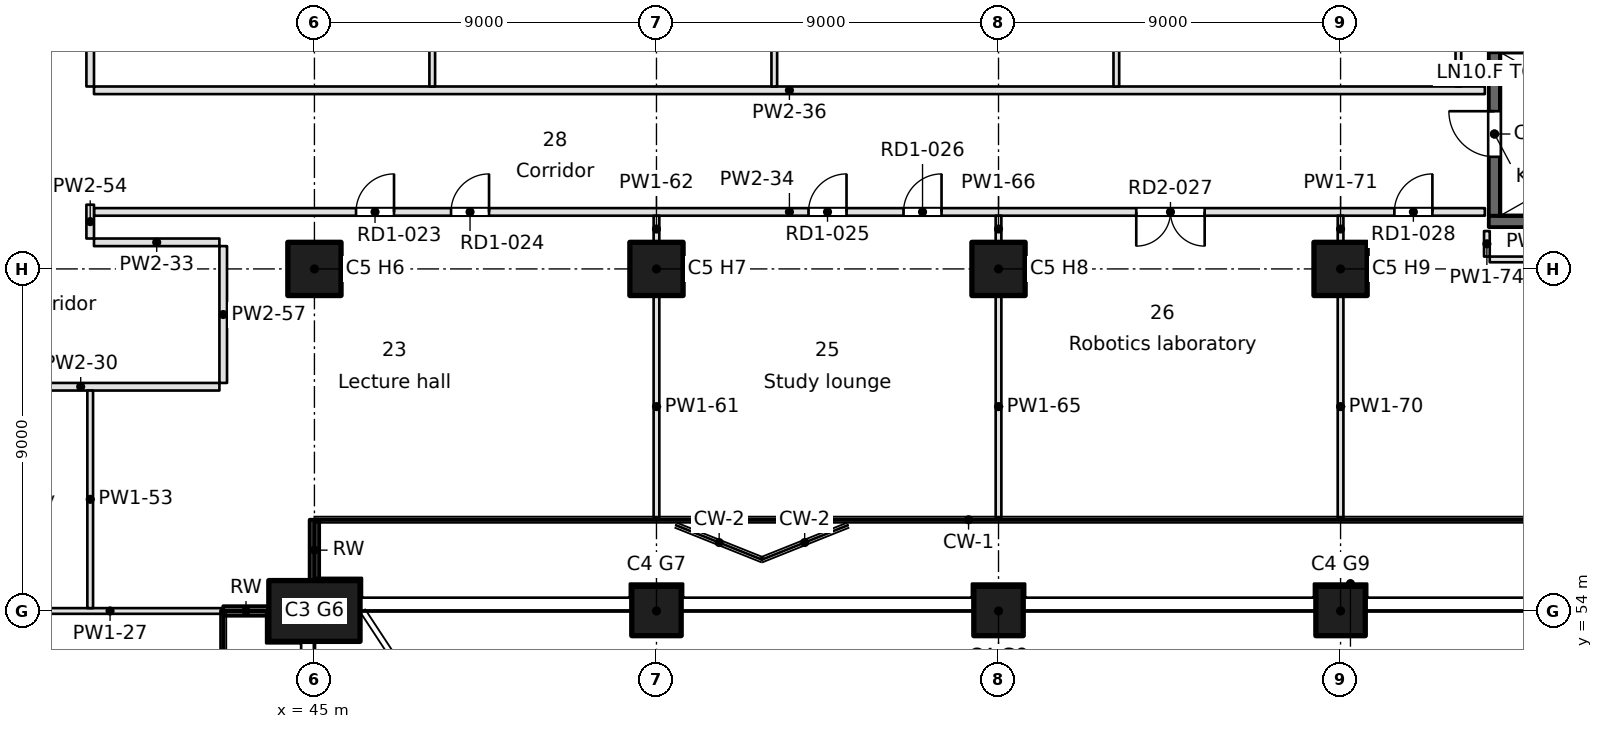
"""IFC4 building model, lengths in metres.
Left out: names, types, materials, properties, quantities, classifications, styles, units other than length and angle.
Written with IfcOpenShell. Run it as: python <this file> out.ifc"""

import sys

from ifc_helpers import new_model, si_unit, direction, frame, frame_2d, origin, origin_2d, place, context, subcontext, project, spatial, rectangle, extrude, element, fill, save


model = new_model("IFC4")
c1 = context("Model", 3, precision=1e-05, world=origin(), true_north=direction((0.0, 1.0)))
c2 = subcontext(c1, "Body", "Model", "MODEL_VIEW")
j1 = project(units=[si_unit("LENGTHUNIT", "METRE"), si_unit("PLANEANGLEUNIT", "RADIAN")], contexts=[c1])
p1 = place(None, origin())
s1 = spatial("IfcSite", under=j1, at=p1, CompositionType="ELEMENT")
p2 = place(p1, origin())
s2 = spatial("IfcBuilding", under=s1, at=p2, CompositionType="ELEMENT")
p3 = place(p2, frame((0.0, 0.0, 35.8)))
s3 = spatial("IfcBuildingStorey", under=s2, at=p3, CompositionType="ELEMENT", Elevation=35.8)
p4 = place(p3, frame((45.0, 54.0, 0.0), z_axis=(0.0, 0.0, 1.0), x_axis=(1.0, 0.0, 0.0)))
e1 = element("IfcColumn", 1, at=p4, inside=s3, PredefinedType="COLUMN", context=c2, shape_type="SweptSolid", body=[
    extrude(rectangle(XDim=2.4, YDim=1.6, at=origin_2d()), origin(), (0.0, 0.0, 1.0), 3.7),
])
for number, where, z_axis, x_axis in (
    (2, (54.0, 54.0, 0.0), (0.0, 0.0, 1.0), (1.0, 0.0, 0.0)),
    (3, (63.0, 54.0, 0.0), (0.0, 0.0, 1.0), (1.0, 0.0, 0.0)),
    (4, (72.0, 54.0, 0.0), (0.0, 0.0, 1.0), (1.0, 0.0, 0.0)),
):
    element("IfcColumn", number, at=place(p3, frame(where, z_axis=z_axis, x_axis=x_axis)), inside=s3, PredefinedType="COLUMN", context=c2, shape_type="SweptSolid", body=[
        extrude(rectangle(XDim=1.3, YDim=1.3, at=origin_2d()), origin(), (0.0, 0.0, 1.0), 3.7),
    ])
for number, where, z_axis, x_axis in (
    (5, (45.0, 63.0, 0.0), (0.0, 0.0, 1.0), (1.0, 0.0, 0.0)),
    (6, (54.0, 63.0, 0.0), (0.0, 0.0, 1.0), (1.0, 0.0, 0.0)),
    (7, (63.0, 63.0, 0.0), (0.0, 0.0, 1.0), (1.0, 0.0, 0.0)),
    (8, (72.0, 63.0, 0.0), (0.0, 0.0, 1.0), (1.0, 0.0, 0.0)),
):
    element("IfcColumn", number, at=place(p3, frame(where, z_axis=z_axis, x_axis=x_axis)), inside=s3, PredefinedType="COLUMN", context=c2, shape_type="SweptSolid", body=[
        extrude(rectangle(XDim=1.4, YDim=1.4, at=origin_2d()), origin(), (0.0, 0.0, 1.0), 3.7),
    ])
p5 = place(p3, frame((42.599, 54.0, 0.0), z_axis=(0.0, 0.0, 1.0), x_axis=(0.999999917344, 0.000406586671, 0.0)))
e9 = element("IfcWall", 9, at=p5, inside=s3, PredefinedType="SOLIDWALL", context=c2, shape_type="SweptSolid", body=[
    extrude(rectangle(XDim=1.201, YDim=0.25, at=frame_2d((0.601, 0.0))), origin(), (0.0, 0.0, 1.0), 3.3),
])
p6 = place(p3, frame((44.999, 54.8, 0.0), z_axis=(0.0, 0.0, 1.0), x_axis=(0.000152508767, 0.999999988371, 0.0)))
e10 = element("IfcWall", 10, at=p6, inside=s3, PredefinedType="SOLIDWALL", context=c2, shape_type="SweptSolid", body=[
    extrude(rectangle(XDim=1.601, YDim=0.25, at=frame_2d((0.8, 0.0))), origin(), (0.0, 0.0, 1.0), 3.3),
])
p7 = place(p3, frame((75.9, 64.25, -0.4), z_axis=(0.0, 0.0, 1.0), x_axis=(1.0, 0.0, 0.0)))
e11 = element("IfcWall", 11, at=p7, inside=s3, PredefinedType="SOLIDWALL", context=c2, shape_type="SweptSolid", body=[
    extrude(rectangle(XDim=8.2, YDim=0.3, at=frame_2d((4.1, 0.0))), origin(), (0.0, 0.0, 1.0), 3.7),
])
p8 = place(p3, frame((76.05, 64.4, -0.4), z_axis=(0.0, 0.0, 1.0), x_axis=(0.0, 1.0, 0.0)))
e12 = element("IfcWall", 12, at=p8, inside=s3, PredefinedType="SOLIDWALL", context=c2, shape_type="SweptSolid", body=[
    extrude(rectangle(XDim=4.3, YDim=0.3, at=frame_2d((2.15, 0.0))), origin(), (0.0, 0.0, 1.0), 3.7),
])
p9 = place(p8, frame((1.55, 0.0, 0.4)))
e13 = element("IfcOpeningElement", 13, at=p9, cuts=e12, PredefinedType="OPENING", context=c2, shape_type="SweptSolid", body=[
    extrude(rectangle(XDim=1.2, YDim=2.1, at=frame_2d((0.6, 1.05))), frame((0.0, 0.15, 0.0), z_axis=(0.0, -1.0, 0.0), x_axis=(1.0, 0.0, 0.0)), (0.0, 0.0, 1.0), 0.3),
])
p10 = place(p3, frame((36.7, 54.0, 0.0), z_axis=(0.0, 0.0, 1.0), x_axis=(1.0, 0.0, 0.0)))
e14 = element("IfcWall", 14, at=p10, inside=s3, PredefinedType="PARTITIONING", context=c2, shape_type="SweptSolid", body=[
    extrude(rectangle(XDim=5.845, YDim=0.15, at=frame_2d((2.922, 0.0))), origin(), (0.0, 0.0, 1.0), 3.3),
])
p11 = place(p3, frame((42.5, 59.9, 0.0), z_axis=(0.0, 0.0, 1.0), x_axis=(-1.0, 0.0, 0.0)))
e15 = element("IfcWall", 15, at=p11, inside=s3, PredefinedType="PARTITIONING", context=c2, shape_type="SweptSolid", body=[
    extrude(rectangle(XDim=7.3, YDim=0.2, at=frame_2d((3.65, 0.0))), origin(), (0.0, 0.0, 1.0), 3.3),
])
p12 = place(p3, frame((75.925, 63.25, 0.0), z_axis=(0.0, 0.0, 1.0), x_axis=(1.0, 0.0, 0.0)))
e16 = element("IfcWall", 16, at=p12, inside=s3, PredefinedType="PARTITIONING", context=c2, shape_type="SweptSolid", body=[
    extrude(rectangle(XDim=4.375, YDim=0.15, at=frame_2d((2.188, 0.0))), origin(), (0.0, 0.0, 1.0), 3.3),
])
p13 = place(p3, frame((39.2, 63.7, 0.0), z_axis=(0.0, 0.0, 1.0), x_axis=(1.0, 0.0, 0.0)))
e17 = element("IfcWall", 17, at=p13, inside=s3, PredefinedType="PARTITIONING", context=c2, shape_type="SweptSolid", body=[
    extrude(rectangle(XDim=3.3, YDim=0.2, at=frame_2d((1.65, 0.0))), origin(), (0.0, 0.0, 1.0), 3.3),
])
p14 = place(p3, frame((75.796, 64.5, 0.0), z_axis=(0.0, 0.0, 1.0), x_axis=(-1.0, 0.0, 0.0)))
e18 = element("IfcWall", 18, at=p14, inside=s3, PredefinedType="PARTITIONING", context=c2, shape_type="SweptSolid", body=[
    extrude(rectangle(XDim=36.596, YDim=0.2, at=frame_2d((18.298, 0.0))), origin(), (0.0, 0.0, 1.0), 3.3),
])
p15 = place(p14, frame((28.702, 0.0, 0.0)))
e19 = element("IfcOpeningElement", 19, at=p15, cuts=e18, PredefinedType="OPENING", context=c2, shape_type="SweptSolid", body=[
    extrude(rectangle(XDim=1.0, YDim=2.1, at=frame_2d((0.5, 1.05))), frame((0.0, 0.1, 0.0), z_axis=(0.0, -1.0, 0.0), x_axis=(1.0, 0.0, 0.0)), (0.0, 0.0, 1.0), 0.2),
])
p16 = place(p14, frame((26.202, 0.0, 0.0)))
e20 = element("IfcOpeningElement", 20, at=p16, cuts=e18, PredefinedType="OPENING", context=c2, shape_type="SweptSolid", body=[
    extrude(rectangle(XDim=1.0, YDim=2.1, at=frame_2d((0.5, 1.05))), frame((0.0, 0.1, 0.0), z_axis=(0.0, -1.0, 0.0), x_axis=(1.0, 0.0, 0.0)), (0.0, 0.0, 1.0), 0.2),
])
p17 = place(p14, frame((16.795, 0.0, 0.0)))
e21 = element("IfcOpeningElement", 21, at=p17, cuts=e18, PredefinedType="OPENING", context=c2, shape_type="SweptSolid", body=[
    extrude(rectangle(XDim=1.0, YDim=2.1, at=frame_2d((0.5, 1.05))), frame((0.0, 0.1, 0.0), z_axis=(0.0, -1.0, 0.0), x_axis=(1.0, 0.0, 0.0)), (0.0, 0.0, 1.0), 0.2),
])
p18 = place(p14, frame((14.295, 0.0, 0.0)))
e22 = element("IfcOpeningElement", 22, at=p18, cuts=e18, PredefinedType="OPENING", context=c2, shape_type="SweptSolid", body=[
    extrude(rectangle(XDim=1.0, YDim=2.1, at=frame_2d((0.5, 1.05))), frame((0.0, 0.1, 0.0), z_axis=(0.0, -1.0, 0.0), x_axis=(1.0, 0.0, 0.0)), (0.0, 0.0, 1.0), 0.2),
])
p19 = place(p14, frame((7.372, 0.0, 0.0)))
e23 = element("IfcOpeningElement", 23, at=p19, cuts=e18, PredefinedType="OPENING", context=c2, shape_type="SweptSolid", body=[
    extrude(rectangle(XDim=1.8, YDim=2.1, at=frame_2d((0.9, 1.05))), frame((0.0, 0.1, 0.0), z_axis=(0.0, -1.0, 0.0), x_axis=(1.0, 0.0, 0.0)), (0.0, 0.0, 1.0), 0.2),
])
p20 = place(p14, frame((1.38, 0.0, 0.0)))
e24 = element("IfcOpeningElement", 24, at=p20, cuts=e18, PredefinedType="OPENING", context=c2, shape_type="SweptSolid", body=[
    extrude(rectangle(XDim=1.0, YDim=2.1, at=frame_2d((0.5, 1.05))), frame((0.0, 0.1, 0.0), z_axis=(0.0, -1.0, 0.0), x_axis=(1.0, 0.0, 0.0)), (0.0, 0.0, 1.0), 0.2),
])
p21 = place(p3, frame((39.2, 67.7, 0.0), z_axis=(0.0, 0.0, 1.0), x_axis=(1.0, 0.0, 0.0)))
e25 = element("IfcWall", 25, at=p21, inside=s3, PredefinedType="PARTITIONING", context=c2, shape_type="SweptSolid", body=[
    extrude(rectangle(XDim=36.596, YDim=0.2, at=frame_2d((18.298, 0.0))), origin(), (0.0, 0.0, 1.0), 3.3),
])
p22 = place(p3, frame((39.1, 59.8, 0.0), z_axis=(0.0, 0.0, 1.0), x_axis=(0.0, -1.0, 0.0)))
e26 = element("IfcWall", 26, at=p22, inside=s3, PredefinedType="PARTITIONING", context=c2, shape_type="SweptSolid", body=[
    extrude(rectangle(XDim=5.725, YDim=0.15, at=frame_2d((2.863, 0.0))), origin(), (0.0, 0.0, 1.0), 3.3),
])
p23 = place(p3, frame((39.1, 64.69, 0.0), z_axis=(0.0, 0.0, 1.0), x_axis=(0.0, -1.0, 0.0)))
e27 = element("IfcWall", 27, at=p23, inside=s3, PredefinedType="PARTITIONING", context=c2, shape_type="SweptSolid", body=[
    extrude(rectangle(XDim=0.89, YDim=0.2, at=frame_2d((0.445, 0.0))), origin(), (0.0, 0.0, 1.0), 3.3),
])
p24 = place(p3, frame((39.1, 82.012, 0.0), z_axis=(0.0, 0.0, 1.0), x_axis=(0.0, -1.0, 0.0)))
e28 = element("IfcWall", 28, at=p24, inside=s3, PredefinedType="PARTITIONING", context=c2, shape_type="SweptSolid", body=[
    extrude(rectangle(XDim=14.212, YDim=0.2, at=frame_2d((7.106, 0.0))), origin(), (0.0, 0.0, 1.0), 3.3),
])
p25 = place(p24, frame((6.733, 0.0, 0.0)))
e29 = element("IfcOpeningElement", 29, at=p25, cuts=e28, PredefinedType="OPENING", context=c2, shape_type="SweptSolid", body=[
    extrude(rectangle(XDim=1.0, YDim=2.1, at=frame_2d((0.5, 1.05))), frame((0.0, 0.1, 0.0), z_axis=(0.0, -1.0, 0.0), x_axis=(1.0, 0.0, 0.0)), (0.0, 0.0, 1.0), 0.2),
])
p26 = place(p24, frame((4.233, 0.0, 0.0)))
e30 = element("IfcOpeningElement", 30, at=p26, cuts=e28, PredefinedType="OPENING", context=c2, shape_type="SweptSolid", body=[
    extrude(rectangle(XDim=1.0, YDim=2.1, at=frame_2d((0.5, 1.05))), frame((0.0, 0.1, 0.0), z_axis=(0.0, -1.0, 0.0), x_axis=(1.0, 0.0, 0.0)), (0.0, 0.0, 1.0), 0.2),
])
p27 = place(p3, frame((42.6, 63.6, 0.0), z_axis=(0.0, 0.0, 1.0), x_axis=(0.0, -1.0, 0.0)))
e31 = element("IfcWall", 31, at=p27, inside=s3, PredefinedType="PARTITIONING", context=c2, shape_type="SweptSolid", body=[
    extrude(rectangle(XDim=3.6, YDim=0.2, at=frame_2d((1.8, 0.0))), origin(), (0.0, 0.0, 1.0), 3.3),
])
p28 = place(p3, frame((48.1, 81.7, 0.0), z_axis=(0.0, 0.0, 1.0), x_axis=(0.0, -1.0, 0.0)))
e32 = element("IfcWall", 32, at=p28, inside=s3, PredefinedType="PARTITIONING", context=c2, shape_type="SweptSolid", body=[
    extrude(rectangle(XDim=13.9, YDim=0.15, at=frame_2d((6.95, 0.0))), origin(), (0.0, 0.0, 1.0), 3.3),
])
p29 = place(p3, frame((54.0, 62.3, 0.0), z_axis=(0.0, 0.0, 1.0), x_axis=(0.0, -1.0, 0.0)))
e33 = element("IfcWall", 33, at=p29, inside=s3, PredefinedType="PARTITIONING", context=c2, shape_type="SweptSolid", body=[
    extrude(rectangle(XDim=5.845, YDim=0.15, at=frame_2d((2.923, 0.0))), origin(), (0.0, 0.0, 1.0), 3.3),
])
p30 = place(p3, frame((54.0, 64.4, 0.0), z_axis=(0.0, 0.0, 1.0), x_axis=(0.0, -1.0, 0.0)))
e34 = element("IfcWall", 34, at=p30, inside=s3, PredefinedType="PARTITIONING", context=c2, shape_type="SweptSolid", body=[
    extrude(rectangle(XDim=0.7, YDim=0.15, at=frame_2d((0.35, 0.0))), origin(), (0.0, 0.0, 1.0), 3.3),
])
p31 = place(p3, frame((57.1, 81.7, 0.0), z_axis=(0.0, 0.0, 1.0), x_axis=(0.0, -1.0, 0.0)))
e35 = element("IfcWall", 35, at=p31, inside=s3, PredefinedType="PARTITIONING", context=c2, shape_type="SweptSolid", body=[
    extrude(rectangle(XDim=13.9, YDim=0.15, at=frame_2d((6.95, 0.0))), origin(), (0.0, 0.0, 1.0), 3.3),
])
p32 = place(p3, frame((63.0, 62.3, 0.0), z_axis=(0.0, 0.0, 1.0), x_axis=(0.0, -1.0, 0.0)))
e36 = element("IfcWall", 36, at=p32, inside=s3, PredefinedType="PARTITIONING", context=c2, shape_type="SweptSolid", body=[
    extrude(rectangle(XDim=5.845, YDim=0.15, at=frame_2d((2.923, 0.0))), origin(), (0.0, 0.0, 1.0), 3.3),
])
p33 = place(p3, frame((63.0, 64.4, 0.0), z_axis=(0.0, 0.0, 1.0), x_axis=(0.0, -1.0, 0.0)))
e37 = element("IfcWall", 37, at=p33, inside=s3, PredefinedType="PARTITIONING", context=c2, shape_type="SweptSolid", body=[
    extrude(rectangle(XDim=0.7, YDim=0.15, at=frame_2d((0.35, 0.0))), origin(), (0.0, 0.0, 1.0), 3.3),
])
p34 = place(p3, frame((66.1, 81.7, 0.0), z_axis=(0.0, 0.0, 1.0), x_axis=(0.0, -1.0, 0.0)))
e38 = element("IfcWall", 38, at=p34, inside=s3, PredefinedType="PARTITIONING", context=c2, shape_type="SweptSolid", body=[
    extrude(rectangle(XDim=13.9, YDim=0.15, at=frame_2d((6.95, 0.0))), origin(), (0.0, 0.0, 1.0), 3.3),
])
p35 = place(p3, frame((72.0, 62.3, 0.0), z_axis=(0.0, 0.0, 1.0), x_axis=(0.0, -1.0, 0.0)))
e39 = element("IfcWall", 39, at=p35, inside=s3, PredefinedType="PARTITIONING", context=c2, shape_type="SweptSolid", body=[
    extrude(rectangle(XDim=5.845, YDim=0.15, at=frame_2d((2.923, 0.0))), origin(), (0.0, 0.0, 1.0), 3.3),
])
p36 = place(p3, frame((72.0, 64.4, 0.0), z_axis=(0.0, 0.0, 1.0), x_axis=(0.0, -1.0, 0.0)))
e40 = element("IfcWall", 40, at=p36, inside=s3, PredefinedType="PARTITIONING", context=c2, shape_type="SweptSolid", body=[
    extrude(rectangle(XDim=0.7, YDim=0.15, at=frame_2d((0.35, 0.0))), origin(), (0.0, 0.0, 1.0), 3.3),
])
p37 = place(p3, frame((75.1, 81.7, 0.0), z_axis=(0.0, 0.0, 1.0), x_axis=(0.0, -1.0, 0.0)))
e41 = element("IfcWall", 41, at=p37, inside=s3, PredefinedType="PARTITIONING", context=c2, shape_type="SweptSolid", body=[
    extrude(rectangle(XDim=13.9, YDim=0.15, at=frame_2d((6.95, 0.0))), origin(), (0.0, 0.0, 1.0), 3.3),
])
p38 = place(p3, frame((75.85, 63.996, 0.0), z_axis=(0.0, 0.0, 1.0), x_axis=(0.0, -1.0, 0.0)))
e42 = element("IfcWall", 42, at=p38, inside=s3, PredefinedType="PARTITIONING", context=c2, shape_type="SweptSolid", body=[
    extrude(rectangle(XDim=0.671, YDim=0.15, at=frame_2d((0.335, 0.0))), origin(), (0.0, 0.0, 1.0), 3.3),
])
p39 = place(p9, origin())
e43 = element("IfcDoor", 43, at=p39, inside=s3, OperationType="SINGLE_SWING_RIGHT", PredefinedType="DOOR", context=c2, shape_type="SweptSolid", body=[
    extrude(rectangle(XDim=1.2, YDim=2.1, at=frame_2d((0.6, 1.05))), frame((0.0, 0.025, 0.0), z_axis=(0.0, -1.0, 0.0), x_axis=(1.0, 0.0, 0.0)), (0.0, 0.0, 1.0), 0.05),
])
fill(e13, e43)
p40 = place(p15, frame((1.0, 0.0, 0.0), z_axis=(0.0, 0.0, 1.0), x_axis=(-1.0, 0.0, 0.0)))
e44 = element("IfcDoor", 44, at=p40, inside=s3, OperationType="SINGLE_SWING_RIGHT", PredefinedType="DOOR", context=c2, shape_type="SweptSolid", body=[
    extrude(rectangle(XDim=1.0, YDim=2.1, at=frame_2d((0.5, 1.05))), frame((0.0, 0.025, 0.0), z_axis=(0.0, -1.0, 0.0), x_axis=(1.0, 0.0, 0.0)), (0.0, 0.0, 1.0), 0.05),
])
fill(e19, e44)
p41 = place(p16, frame((1.0, 0.0, 0.0), z_axis=(0.0, 0.0, 1.0), x_axis=(-1.0, 0.0, 0.0)))
e45 = element("IfcDoor", 45, at=p41, inside=s3, OperationType="SINGLE_SWING_RIGHT", PredefinedType="DOOR", context=c2, shape_type="SweptSolid", body=[
    extrude(rectangle(XDim=1.0, YDim=2.1, at=frame_2d((0.5, 1.05))), frame((0.0, 0.025, 0.0), z_axis=(0.0, -1.0, 0.0), x_axis=(1.0, 0.0, 0.0)), (0.0, 0.0, 1.0), 0.05),
])
fill(e20, e45)
p42 = place(p17, frame((1.0, 0.0, 0.0), z_axis=(0.0, 0.0, 1.0), x_axis=(-1.0, 0.0, 0.0)))
e46 = element("IfcDoor", 46, at=p42, inside=s3, OperationType="SINGLE_SWING_RIGHT", PredefinedType="DOOR", context=c2, shape_type="SweptSolid", body=[
    extrude(rectangle(XDim=1.0, YDim=2.1, at=frame_2d((0.5, 1.05))), frame((0.0, 0.025, 0.0), z_axis=(0.0, -1.0, 0.0), x_axis=(1.0, 0.0, 0.0)), (0.0, 0.0, 1.0), 0.05),
])
fill(e21, e46)
p43 = place(p18, frame((1.0, 0.0, 0.0), z_axis=(0.0, 0.0, 1.0), x_axis=(-1.0, 0.0, 0.0)))
e47 = element("IfcDoor", 47, at=p43, inside=s3, OperationType="SINGLE_SWING_RIGHT", PredefinedType="DOOR", context=c2, shape_type="SweptSolid", body=[
    extrude(rectangle(XDim=1.0, YDim=2.1, at=frame_2d((0.5, 1.05))), frame((0.0, 0.025, 0.0), z_axis=(0.0, -1.0, 0.0), x_axis=(1.0, 0.0, 0.0)), (0.0, 0.0, 1.0), 0.05),
])
fill(e22, e47)
p44 = place(p19, origin())
e48 = element("IfcDoor", 48, at=p44, inside=s3, OperationType="DOUBLE_DOOR_SINGLE_SWING", PredefinedType="DOOR", context=c2, shape_type="SweptSolid", body=[
    extrude(rectangle(XDim=1.8, YDim=2.1, at=frame_2d((0.9, 1.05))), frame((0.0, 0.025, 0.0), z_axis=(0.0, -1.0, 0.0), x_axis=(1.0, 0.0, 0.0)), (0.0, 0.0, 1.0), 0.05),
])
fill(e23, e48)
p45 = place(p20, frame((1.0, 0.0, 0.0), z_axis=(0.0, 0.0, 1.0), x_axis=(-1.0, 0.0, 0.0)))
e49 = element("IfcDoor", 49, at=p45, inside=s3, OperationType="SINGLE_SWING_RIGHT", PredefinedType="DOOR", context=c2, shape_type="SweptSolid", body=[
    extrude(rectangle(XDim=1.0, YDim=2.1, at=frame_2d((0.5, 1.05))), frame((0.0, 0.025, 0.0), z_axis=(0.0, -1.0, 0.0), x_axis=(1.0, 0.0, 0.0)), (0.0, 0.0, 1.0), 0.05),
])
fill(e24, e49)
save(model, sys.argv[1])
